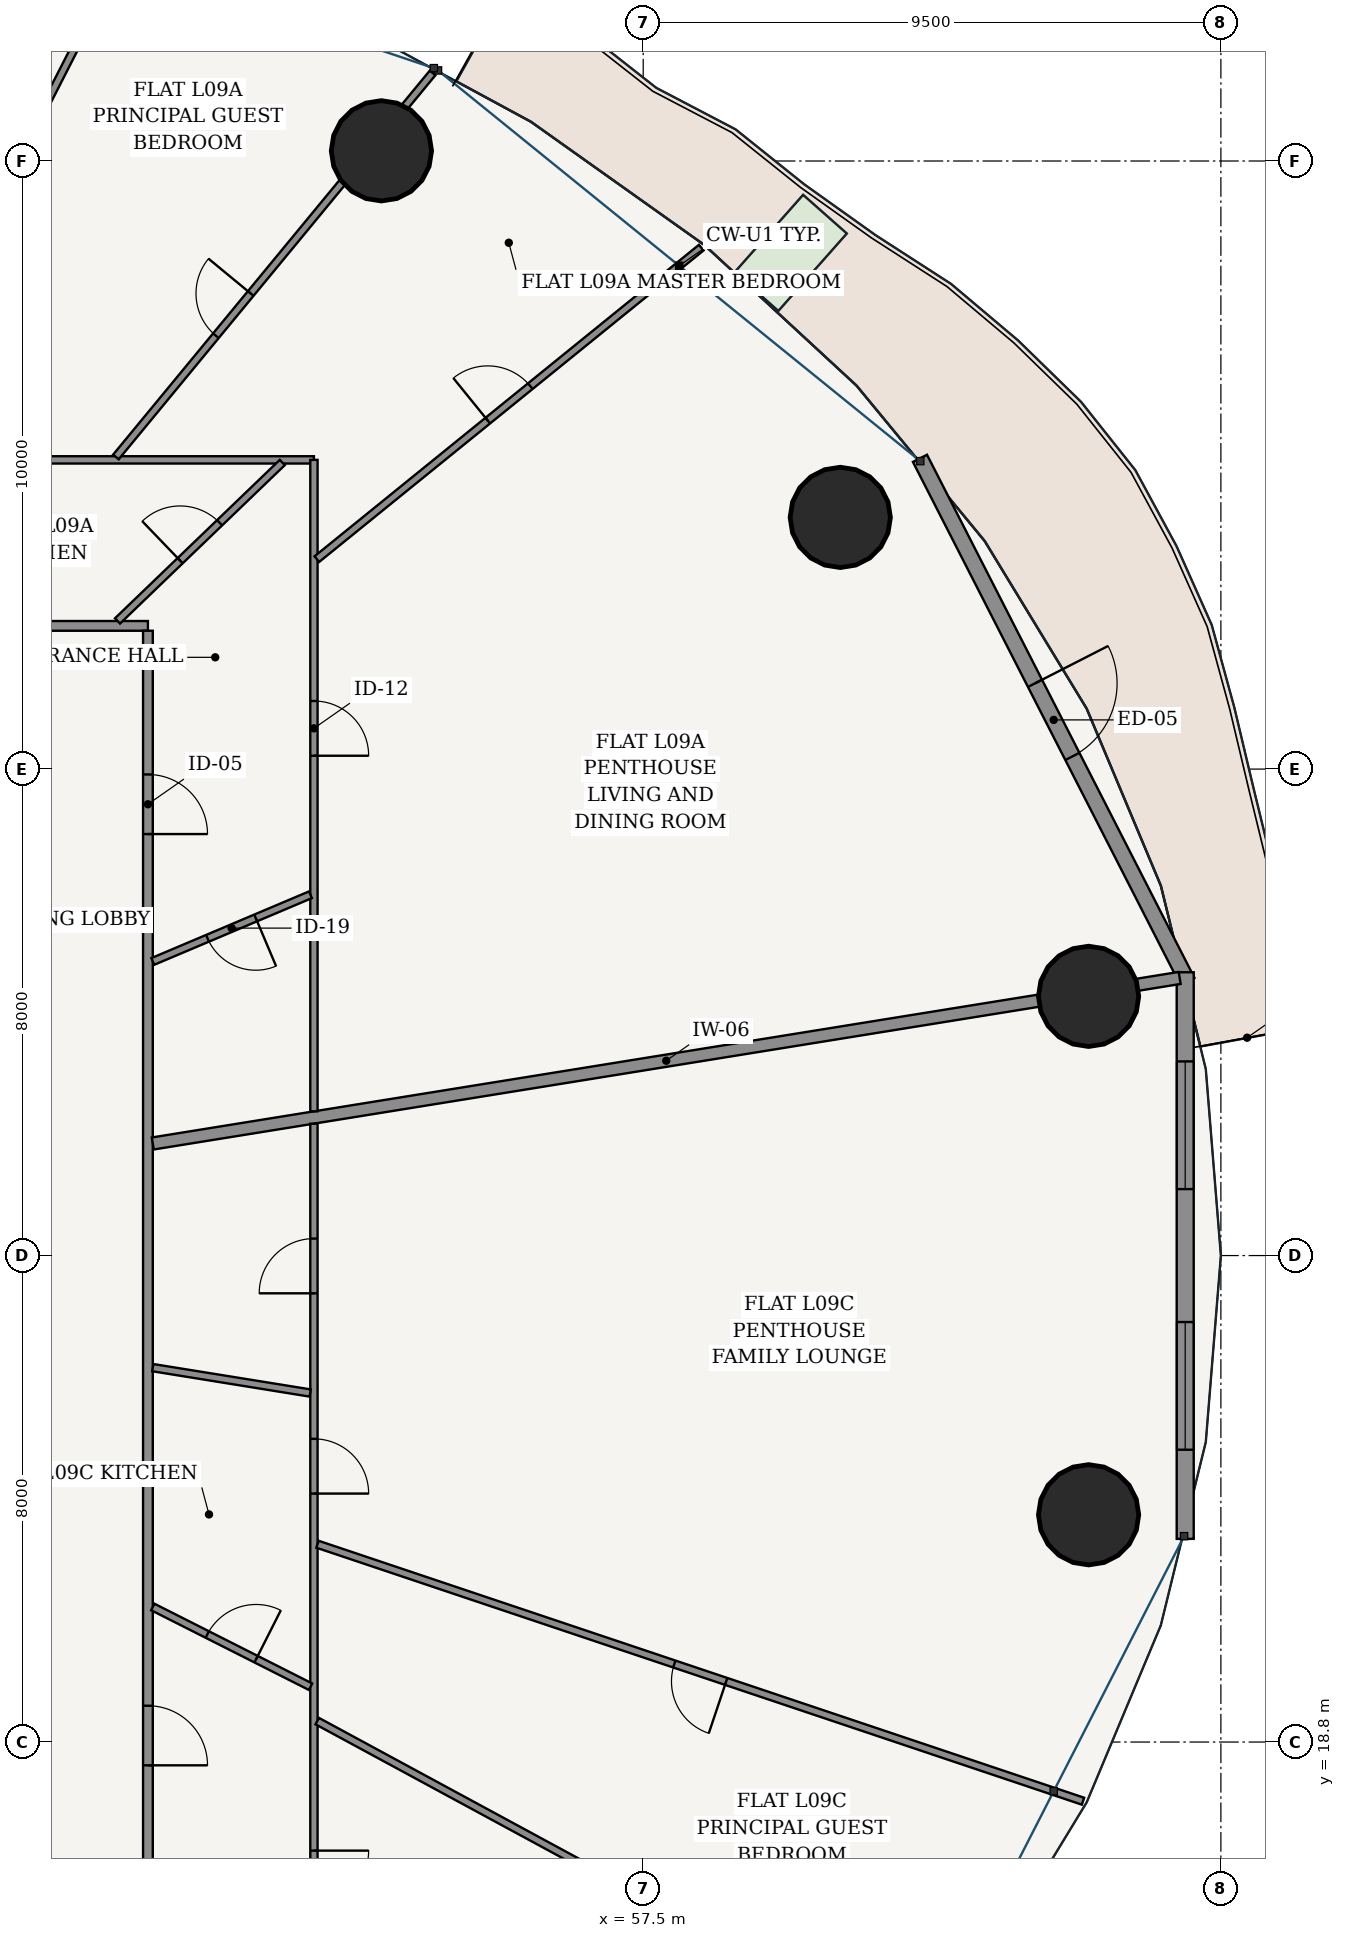
"""IFC4 building model, lengths in metres.
Left out: names, types, materials, properties, quantities, classifications, styles, units other than length and angle.
Written with IfcOpenShell. Run it as: python <this file> out.ifc"""

import sys

from ifc_helpers import new_model, si_unit, direction, frame, frame_2d, origin, origin_2d, place, context, subcontext, project, spatial, rectangle, hollow_circle, extrude, source, transform, mapped, element, fill, save


model = new_model("IFC4")
c1 = context("Model", 3, precision=1e-05, world=origin(), true_north=direction((-0.2419218956, 0.970295726276)))
c2 = subcontext(c1, "Body", "Model", "MODEL_VIEW")
j1 = project(units=[si_unit("LENGTHUNIT", "METRE"), si_unit("PLANEANGLEUNIT", "RADIAN")], contexts=[c1])
p1 = place(None, origin())
s1 = spatial("IfcSite", under=j1, at=p1, CompositionType="ELEMENT")
p2 = place(p1, origin())
s2 = spatial("IfcBuilding", under=s1, at=p2, CompositionType="ELEMENT")
p3 = place(p2, frame((0.0, 0.0, 38.4)))
s3 = spatial("IfcBuildingStorey", under=s2, at=p3, CompositionType="ELEMENT", Elevation=38.4)
for number, where, z_axis, x_axis in (
    (1, (64.824, 31.063, 0.0), (0.0, 0.0, 1.0), (1.0, 0.0, 0.0)),
    (2, (60.741, 38.939, 0.0), (0.0, 0.0, 1.0), (1.0, 0.0, 0.0)),
    (3, (53.195, 44.968, 0.0), (0.0, 0.0, 1.0), (1.0, 0.0, 0.0)),
    (4, (64.824, 22.537, 0.0), (0.0, 0.0, 1.0), (1.0, 0.0, 0.0)),
):
    element("IfcColumn", number, at=place(p3, frame(where, z_axis=z_axis, x_axis=x_axis)), inside=s3, PredefinedType="COLUMN", context=c2, shape_type="SweptSolid", body=[
        extrude(hollow_circle(Radius=0.825, WallThickness=0.05, at=origin_2d()), origin(), (0.0, 0.0, 1.0), 3.6),
    ])
p4 = place(p3, frame((66.45, 31.308, 0.0), z_axis=(0.0, 0.0, 1.0), x_axis=(-0.45523081716, 0.890373462715, 0.0)))
e5 = element("IfcWall", 5, at=p4, inside=s3, PredefinedType="SOLIDWALL", context=c2, shape_type="SweptSolid", body=[
    extrude(rectangle(XDim=9.662, YDim=0.26, at=frame_2d((4.831, 0.0))), origin(), (0.0, 0.0, 1.0), 3.32),
])
p5 = place(p4, frame((4.156, 0.0, 0.0)))
e6 = element("IfcOpeningElement", 6, at=p5, cuts=e5, PredefinedType="OPENING", context=c2, shape_type="SweptSolid", body=[
    extrude(rectangle(XDim=1.35, YDim=2.2, at=frame_2d((0.675, 1.1))), frame((0.0, 0.14, 0.0), z_axis=(0.0, -1.0, 0.0), x_axis=(1.0, 0.0, 0.0)), (0.0, 0.0, 1.0), 0.28),
])
p6 = place(p3, frame((66.413, 22.141, 0.0), z_axis=(0.0, 0.0, 1.0), x_axis=(0.0, 1.0, 0.0)))
e7 = element("IfcWall", 7, at=p6, inside=s3, PredefinedType="SOLIDWALL", context=c2, shape_type="SweptSolid", body=[
    extrude(rectangle(XDim=9.318, YDim=0.28, at=frame_2d((4.659, 0.0))), origin(), (0.0, 0.0, 1.0), 3.32),
])
p7 = place(p6, frame((1.466, 0.0, 0.85)))
e8 = element("IfcOpeningElement", 8, at=p7, cuts=e7, PredefinedType="OPENING", context=c2, shape_type="SweptSolid", body=[
    extrude(rectangle(XDim=2.1, YDim=1.95, at=frame_2d((1.05, 0.975))), frame((0.0, 0.15, 0.0), z_axis=(0.0, -1.0, 0.0), x_axis=(1.0, 0.0, 0.0)), (0.0, 0.0, 1.0), 0.3),
])
p8 = place(p6, frame((5.752, 0.0, 0.85)))
e9 = element("IfcOpeningElement", 9, at=p8, cuts=e7, PredefinedType="OPENING", context=c2, shape_type="SweptSolid", body=[
    extrude(rectangle(XDim=2.1, YDim=1.95, at=frame_2d((1.05, 0.975))), frame((0.0, 0.15, 0.0), z_axis=(0.0, -1.0, 0.0), x_axis=(1.0, 0.0, 0.0)), (0.0, 0.0, 1.0), 0.3),
])
p9 = place(p3, frame((26.645, 37.155, 0.0), z_axis=(0.0, 0.0, 1.0), x_axis=(1.0, 0.0, 0.0)))
e10 = element("IfcWall", 10, at=p9, inside=s3, PredefinedType="PARTITIONING", context=c2, shape_type="SweptSolid", body=[
    extrude(rectangle(XDim=22.71, YDim=0.16, at=frame_2d((11.355, 0.0))), origin(), (0.0, 0.0, 1.0), 2.688),
])
p10 = place(p3, frame((49.355, 16.525, 0.0), z_axis=(0.0, 0.0, 1.0), x_axis=(0.0, 1.0, 0.0)))
e11 = element("IfcWall", 11, at=p10, inside=s3, PredefinedType="PARTITIONING", context=c2, shape_type="SweptSolid", body=[
    extrude(rectangle(XDim=20.55, YDim=0.16, at=frame_2d((10.275, 0.0))), origin(), (0.0, 0.0, 1.0), 2.688),
])
p11 = place(p10, frame((17.207, 0.0, 0.0)))
e12 = element("IfcOpeningElement", 12, at=p11, cuts=e11, PredefinedType="OPENING", context=c2, shape_type="SweptSolid", body=[
    extrude(rectangle(XDim=0.98, YDim=2.2, at=frame_2d((0.49, 1.1))), frame((0.0, 0.09, 0.0), z_axis=(0.0, -1.0, 0.0), x_axis=(1.0, 0.0, 0.0)), (0.0, 0.0, 1.0), 0.18),
])
p12 = place(p10, frame((1.892, 0.0, 0.0)))
e13 = element("IfcOpeningElement", 13, at=p12, cuts=e11, PredefinedType="OPENING", context=c2, shape_type="SweptSolid", body=[
    extrude(rectangle(XDim=0.98, YDim=2.2, at=frame_2d((0.49, 1.1))), frame((0.0, 0.09, 0.0), z_axis=(0.0, -1.0, 0.0), x_axis=(1.0, 0.0, 0.0)), (0.0, 0.0, 1.0), 0.18),
])
p13 = place(p3, frame((49.435, 28.643, 0.0), z_axis=(0.0, 0.0, 1.0), x_axis=(0.987255953651, 0.159140447344, 0.0)))
e14 = element("IfcWall", 14, at=p13, inside=s3, PredefinedType="PARTITIONING", context=c2, shape_type="SweptSolid", body=[
    extrude(rectangle(XDim=17.105, YDim=0.2, at=frame_2d((8.553, 0.0))), origin(), (0.0, 0.0, 1.0), 2.688),
])
p14 = place(p3, frame((27.312, 39.885, 0.0), z_axis=(0.0, 0.0, 1.0), x_axis=(1.0, 0.0, 0.0)))
e15 = element("IfcWall", 15, at=p14, inside=s3, PredefinedType="PARTITIONING", context=c2, shape_type="SweptSolid", body=[
    extrude(rectangle(XDim=24.772, YDim=0.12, at=frame_2d((12.386, 0.0))), origin(), (0.0, 0.0, 1.0), 2.688),
])
p15 = place(p3, frame((52.085, 39.885, 0.0), z_axis=(0.0, 0.0, 1.0), x_axis=(0.0, -1.0, 0.0)))
e16 = element("IfcWall", 16, at=p15, inside=s3, PredefinedType="PARTITIONING", context=c2, shape_type="SweptSolid", body=[
    extrude(rectangle(XDim=10.713, YDim=0.12, at=frame_2d((5.356, 0.0))), origin(), (0.0, 0.0, 1.0), 2.688),
])
p16 = place(p15, frame((3.965, 0.0, 0.0)))
e17 = element("IfcOpeningElement", 17, at=p16, cuts=e16, PredefinedType="OPENING", context=c2, shape_type="SweptSolid", body=[
    extrude(rectangle(XDim=0.9, YDim=2.15, at=frame_2d((0.45, 1.075))), frame((0.0, 0.07, 0.0), z_axis=(0.0, -1.0, 0.0), x_axis=(1.0, 0.0, 0.0)), (0.0, 0.0, 1.0), 0.14),
])
p17 = place(p3, frame((52.133, 38.253, 0.0), z_axis=(0.0, 0.0, 1.0), x_axis=(0.776936623447, 0.629578814087, 0.0)))
e18 = element("IfcWall", 18, at=p17, inside=s3, PredefinedType="PARTITIONING", context=c2, shape_type="SweptSolid", body=[
    extrude(rectangle(XDim=8.136, YDim=0.12, at=frame_2d((4.068, 0.0))), origin(), (0.0, 0.0, 1.0), 2.762),
])
p18 = place(p17, frame((3.618, 0.0, 0.0)))
e19 = element("IfcOpeningElement", 19, at=p18, cuts=e18, PredefinedType="OPENING", context=c2, shape_type="SweptSolid", body=[
    extrude(rectangle(XDim=0.9, YDim=2.15, at=frame_2d((0.45, 1.075))), frame((0.0, 0.07, 0.0), z_axis=(0.0, -1.0, 0.0), x_axis=(1.0, 0.0, 0.0)), (0.0, 0.0, 1.0), 0.14),
])
p19 = place(p3, frame((48.829, 39.933, 0.0), z_axis=(0.0, 0.0, 1.0), x_axis=(0.636192172227, 0.771530634516, 0.0)))
e20 = element("IfcWall", 20, at=p19, inside=s3, PredefinedType="PARTITIONING", context=c2, shape_type="SweptSolid", body=[
    extrude(rectangle(XDim=8.186, YDim=0.12, at=frame_2d((4.093, 0.0))), origin(), (0.0, 0.0, 1.0), 2.688),
])
p20 = place(p19, frame((2.584, 0.0, 0.0)))
e21 = element("IfcOpeningElement", 21, at=p20, cuts=e20, PredefinedType="OPENING", context=c2, shape_type="SweptSolid", body=[
    extrude(rectangle(XDim=0.9, YDim=2.15, at=frame_2d((0.45, 1.075))), frame((0.0, 0.07, 0.0), z_axis=(0.0, -1.0, 0.0), x_axis=(1.0, 0.0, 0.0)), (0.0, 0.0, 1.0), 0.14),
])
p21 = place(p3, frame((44.717, 39.94, 0.0), z_axis=(0.0, 0.0, 1.0), x_axis=(0.455131303234, 0.890424335256, 0.0)))
e22 = element("IfcWall", 22, at=p21, inside=s3, PredefinedType="PARTITIONING", context=c2, shape_type="SweptSolid", body=[
    extrude(rectangle(XDim=9.562, YDim=0.12, at=frame_2d((4.781, 0.0))), origin(), (0.0, 0.0, 1.0), 2.762),
])
p22 = place(p21, frame((4.331, 0.0, 0.0)))
e23 = element("IfcOpeningElement", 23, at=p22, cuts=e22, PredefinedType="OPENING", context=c2, shape_type="SweptSolid", body=[
    extrude(rectangle(XDim=0.9, YDim=2.15, at=frame_2d((0.45, 1.075))), frame((0.0, 0.07, 0.0), z_axis=(0.0, -1.0, 0.0), x_axis=(1.0, 0.0, 0.0)), (0.0, 0.0, 1.0), 0.14),
])
p23 = place(p3, frame((49.435, 31.636, 0.0), z_axis=(0.0, 0.0, 1.0), x_axis=(0.920969644836, 0.389634332792, 0.0)))
e24 = element("IfcWall", 24, at=p23, inside=s3, PredefinedType="PARTITIONING", context=c2, shape_type="SweptSolid", body=[
    extrude(rectangle(XDim=2.815, YDim=0.12, at=frame_2d((1.408, 0.0))), origin(), (0.0, 0.0, 1.0), 3.32),
])
p24 = place(p23, frame((0.978, 0.0, 0.0)))
e25 = element("IfcOpeningElement", 25, at=p24, cuts=e24, PredefinedType="OPENING", context=c2, shape_type="SweptSolid", body=[
    extrude(rectangle(XDim=0.86, YDim=2.15, at=frame_2d((0.43, 1.075))), frame((0.0, 0.07, 0.0), z_axis=(0.0, -1.0, 0.0), x_axis=(1.0, 0.0, 0.0)), (0.0, 0.0, 1.0), 0.14),
])
p25 = place(p3, frame((48.855, 37.236, 0.0), z_axis=(0.0, 0.0, 1.0), x_axis=(0.720835560675, 0.693106120638, 0.0)))
e26 = element("IfcWall", 26, at=p25, inside=s3, PredefinedType="PARTITIONING", context=c2, shape_type="SweptSolid", body=[
    extrude(rectangle(XDim=3.76, YDim=0.12, at=frame_2d((1.88, 0.0))), origin(), (0.0, 0.0, 1.0), 2.999),
])
p26 = place(p25, frame((1.43, 0.0, 0.0)))
e27 = element("IfcOpeningElement", 27, at=p26, cuts=e26, PredefinedType="OPENING", context=c2, shape_type="SweptSolid", body=[
    extrude(rectangle(XDim=0.9, YDim=2.15, at=frame_2d((0.45, 1.075))), frame((0.0, 0.07, 0.0), z_axis=(0.0, -1.0, 0.0), x_axis=(1.0, 0.0, 0.0)), (0.0, 0.0, 1.0), 0.14),
])
p27 = place(p3, frame((52.085, 28.968, 0.0), z_axis=(0.0, 0.0, 1.0), x_axis=(0.0, -1.0, 0.0)))
e28 = element("IfcWall", 28, at=p27, inside=s3, PredefinedType="PARTITIONING", context=c2, shape_type="SweptSolid", body=[
    extrude(rectangle(XDim=15.253, YDim=0.12, at=frame_2d((7.626, 0.0))), origin(), (0.0, 0.0, 1.0), 2.688),
])
p28 = place(p27, frame((11.954, 0.0, 0.0)))
e29 = element("IfcOpeningElement", 29, at=p28, cuts=e28, PredefinedType="OPENING", context=c2, shape_type="SweptSolid", body=[
    extrude(rectangle(XDim=0.9, YDim=2.15, at=frame_2d((0.45, 1.075))), frame((0.0, 0.07, 0.0), z_axis=(0.0, -1.0, 0.0), x_axis=(1.0, 0.0, 0.0)), (0.0, 0.0, 1.0), 0.14),
])
p29 = place(p27, frame((5.182, 0.0, 0.0)))
e30 = element("IfcOpeningElement", 30, at=p29, cuts=e28, PredefinedType="OPENING", context=c2, shape_type="SweptSolid", body=[
    extrude(rectangle(XDim=0.9, YDim=2.15, at=frame_2d((0.45, 1.075))), frame((0.0, 0.07, 0.0), z_axis=(0.0, -1.0, 0.0), x_axis=(1.0, 0.0, 0.0)), (0.0, 0.0, 1.0), 0.14),
])
p30 = place(p27, frame((1.889, 0.0, 0.0)))
e31 = element("IfcOpeningElement", 31, at=p30, cuts=e28, PredefinedType="OPENING", context=c2, shape_type="SweptSolid", body=[
    extrude(rectangle(XDim=0.9, YDim=2.15, at=frame_2d((0.45, 1.075))), frame((0.0, 0.07, 0.0), z_axis=(0.0, -1.0, 0.0), x_axis=(1.0, 0.0, 0.0)), (0.0, 0.0, 1.0), 0.14),
])
p31 = place(p3, frame((52.139, 19.144, 0.0), z_axis=(0.0, 0.0, 1.0), x_axis=(0.879372452045, -0.476134529922, 0.0)))
e32 = element("IfcWall", 32, at=p31, inside=s3, PredefinedType="PARTITIONING", context=c2, shape_type="SweptSolid", body=[
    extrude(rectangle(XDim=11.219, YDim=0.12, at=frame_2d((5.61, 0.0))), origin(), (0.0, 0.0, 1.0), 2.688),
])
p32 = place(p3, frame((52.144, 22.052, 0.0), z_axis=(0.0, 0.0, 1.0), x_axis=(0.948023034133, -0.318201707653, 0.0)))
e33 = element("IfcWall", 33, at=p32, inside=s3, PredefinedType="PARTITIONING", context=c2, shape_type="SweptSolid", body=[
    extrude(rectangle(XDim=13.279, YDim=0.12, at=frame_2d((6.639, 0.0))), origin(), (0.0, 0.0, 1.0), 2.762),
])
p33 = place(p32, frame((6.189, 0.0, 0.0)))
e34 = element("IfcOpeningElement", 34, at=p33, cuts=e33, PredefinedType="OPENING", context=c2, shape_type="SweptSolid", body=[
    extrude(rectangle(XDim=0.9, YDim=2.15, at=frame_2d((0.45, 1.075))), frame((0.0, 0.07, 0.0), z_axis=(0.0, -1.0, 0.0), x_axis=(1.0, 0.0, 0.0)), (0.0, 0.0, 1.0), 0.14),
])
p34 = place(p3, frame((49.435, 21.021, 0.0), z_axis=(0.0, 0.0, 1.0), x_axis=(0.892504324967, -0.451038834155, 0.0)))
e35 = element("IfcWall", 35, at=p34, inside=s3, PredefinedType="PARTITIONING", context=c2, shape_type="SweptSolid", body=[
    extrude(rectangle(XDim=2.907, YDim=0.12, at=frame_2d((1.454, 0.0))), origin(), (0.0, 0.0, 1.0), 3.32),
])
p35 = place(p34, frame((1.004, 0.0, 0.0)))
e36 = element("IfcOpeningElement", 36, at=p35, cuts=e35, PredefinedType="OPENING", context=c2, shape_type="SweptSolid", body=[
    extrude(rectangle(XDim=0.9, YDim=2.15, at=frame_2d((0.45, 1.075))), frame((0.0, 0.07, 0.0), z_axis=(0.0, -1.0, 0.0), x_axis=(1.0, 0.0, 0.0)), (0.0, 0.0, 1.0), 0.14),
])
p36 = place(p3, frame((49.435, 24.957, 0.0), z_axis=(0.0, 0.0, 1.0), x_axis=(0.987258113076, -0.159127050386, 0.0)))
e37 = element("IfcWall", 37, at=p36, inside=s3, PredefinedType="PARTITIONING", context=c2, shape_type="SweptSolid", body=[
    extrude(rectangle(XDim=2.622, YDim=0.12, at=frame_2d((1.311, 0.0))), origin(), (0.0, 0.0, 1.0), 2.688),
])
m1 = source(origin(), c2, "Body", "SweptSolid", [
    extrude(rectangle(XDim=1.35, YDim=2.2, at=frame_2d((0.675, 1.1))), frame((0.0, 0.025, 0.0), z_axis=(0.0, -1.0, 0.0), x_axis=(1.0, 0.0, 0.0)), (0.0, 0.0, 1.0), 0.05),
])
p37 = place(p5, frame((1.35, 0.0, 0.0), z_axis=(0.0, 0.0, 1.0), x_axis=(-1.0, 0.0, 0.0)))
e38 = element("IfcDoor", 38, at=p37, inside=s3, OperationType="SINGLE_SWING_LEFT", PredefinedType="DOOR", context=c2, shape_type="MappedRepresentation", body=[
    mapped(m1, transform((0.0, 0.0, 0.0), scale=1.0)),
])
fill(e6, e38)
m2 = source(origin(), c2, "Body", "SweptSolid", [
    extrude(rectangle(XDim=2.1, YDim=1.95, at=frame_2d((1.05, 0.975))), frame((0.0, 0.03, 0.0), z_axis=(0.0, -1.0, 0.0), x_axis=(1.0, 0.0, 0.0)), (0.0, 0.0, 1.0), 0.06),
])
p38 = place(p7, origin())
e39 = element("IfcWindow", 39, at=p38, inside=s3, PartitioningType="SINGLE_PANEL", PredefinedType="WINDOW", context=c2, shape_type="MappedRepresentation", body=[
    mapped(m2, transform((0.0, 0.0, 0.0), scale=1.0)),
])
fill(e8, e39)
p39 = place(p8, origin())
e40 = element("IfcWindow", 40, at=p39, inside=s3, PartitioningType="SINGLE_PANEL", PredefinedType="WINDOW", context=c2, shape_type="MappedRepresentation", body=[
    mapped(m2, transform((0.0, 0.0, 0.0), scale=1.0)),
])
fill(e9, e40)
m3 = source(origin(), c2, "Body", "SweptSolid", [
    extrude(rectangle(XDim=0.98, YDim=2.2, at=frame_2d((0.49, 1.1))), frame((0.0, 0.025, 0.0), z_axis=(0.0, -1.0, 0.0), x_axis=(1.0, 0.0, 0.0)), (0.0, 0.0, 1.0), 0.05),
])
p40 = place(p11, frame((0.98, 0.0, 0.0), z_axis=(0.0, 0.0, 1.0), x_axis=(-1.0, 0.0, 0.0)))
e41 = element("IfcDoor", 41, at=p40, inside=s3, OperationType="SINGLE_SWING_RIGHT", PredefinedType="DOOR", context=c2, shape_type="MappedRepresentation", body=[
    mapped(m3, transform((0.0, 0.0, 0.0), scale=1.0)),
])
fill(e12, e41)
m4 = source(origin(), c2, "Body", "SweptSolid", [
    extrude(rectangle(XDim=0.86, YDim=2.15, at=frame_2d((0.43, 1.075))), frame((0.0, 0.025, 0.0), z_axis=(0.0, -1.0, 0.0), x_axis=(1.0, 0.0, 0.0)), (0.0, 0.0, 1.0), 0.05),
])
p41 = place(p24, frame((0.86, 0.0, 0.0), z_axis=(0.0, 0.0, 1.0), x_axis=(-1.0, 0.0, 0.0)))
e42 = element("IfcDoor", 42, at=p41, inside=s3, OperationType="SINGLE_SWING_LEFT", PredefinedType="DOOR", context=c2, shape_type="MappedRepresentation", body=[
    mapped(m4, transform((0.0, 0.0, 0.0), scale=1.0)),
])
fill(e25, e42)
m5 = source(origin(), c2, "Body", "SweptSolid", [
    extrude(rectangle(XDim=0.9, YDim=2.15, at=frame_2d((0.45, 1.075))), frame((0.0, 0.025, 0.0), z_axis=(0.0, -1.0, 0.0), x_axis=(1.0, 0.0, 0.0)), (0.0, 0.0, 1.0), 0.05),
])
p42 = place(p16, origin())
e43 = element("IfcDoor", 43, at=p42, inside=s3, OperationType="SINGLE_SWING_RIGHT", PredefinedType="DOOR", context=c2, shape_type="MappedRepresentation", body=[
    mapped(m5, transform((0.0, 0.0, 0.0), scale=1.0)),
])
fill(e17, e43)
p43 = place(p26, origin())
e44 = element("IfcDoor", 44, at=p43, inside=s3, OperationType="SINGLE_SWING_LEFT", PredefinedType="DOOR", context=c2, shape_type="MappedRepresentation", body=[
    mapped(m5, transform((0.0, 0.0, 0.0), scale=1.0)),
])
fill(e27, e44)
p44 = place(p18, origin())
e45 = element("IfcDoor", 45, at=p44, inside=s3, OperationType="SINGLE_SWING_LEFT", PredefinedType="DOOR", context=c2, shape_type="MappedRepresentation", body=[
    mapped(m5, transform((0.0, 0.0, 0.0), scale=1.0)),
])
fill(e19, e45)
p45 = place(p20, origin())
e46 = element("IfcDoor", 46, at=p45, inside=s3, OperationType="SINGLE_SWING_RIGHT", PredefinedType="DOOR", context=c2, shape_type="MappedRepresentation", body=[
    mapped(m5, transform((0.0, 0.0, 0.0), scale=1.0)),
])
fill(e21, e46)
p46 = place(p12, frame((0.98, 0.0, 0.0), z_axis=(0.0, 0.0, 1.0), x_axis=(-1.0, 0.0, 0.0)))
e47 = element("IfcDoor", 47, at=p46, inside=s3, OperationType="SINGLE_SWING_RIGHT", PredefinedType="DOOR", context=c2, shape_type="MappedRepresentation", body=[
    mapped(m3, transform((0.0, 0.0, 0.0), scale=1.0)),
])
fill(e13, e47)
p47 = place(p35, origin())
e48 = element("IfcDoor", 48, at=p47, inside=s3, OperationType="SINGLE_SWING_RIGHT", PredefinedType="DOOR", context=c2, shape_type="MappedRepresentation", body=[
    mapped(m5, transform((0.0, 0.0, 0.0), scale=1.0)),
])
fill(e36, e48)
p48 = place(p28, origin())
e49 = element("IfcDoor", 49, at=p48, inside=s3, OperationType="SINGLE_SWING_LEFT", PredefinedType="DOOR", context=c2, shape_type="MappedRepresentation", body=[
    mapped(m5, transform((0.0, 0.0, 0.0), scale=1.0)),
])
fill(e29, e49)
p49 = place(p29, origin())
e50 = element("IfcDoor", 50, at=p49, inside=s3, OperationType="SINGLE_SWING_RIGHT", PredefinedType="DOOR", context=c2, shape_type="MappedRepresentation", body=[
    mapped(m5, transform((0.0, 0.0, 0.0), scale=1.0)),
])
fill(e30, e50)
p50 = place(p30, frame((0.9, 0.0, 0.0), z_axis=(0.0, 0.0, 1.0), x_axis=(-1.0, 0.0, 0.0)))
e51 = element("IfcDoor", 51, at=p50, inside=s3, OperationType="SINGLE_SWING_LEFT", PredefinedType="DOOR", context=c2, shape_type="MappedRepresentation", body=[
    mapped(m5, transform((0.0, 0.0, 0.0), scale=1.0)),
])
fill(e31, e51)
p51 = place(p33, frame((0.9, 0.0, 0.0), z_axis=(0.0, 0.0, 1.0), x_axis=(-1.0, 0.0, 0.0)))
e52 = element("IfcDoor", 52, at=p51, inside=s3, OperationType="SINGLE_SWING_LEFT", PredefinedType="DOOR", context=c2, shape_type="MappedRepresentation", body=[
    mapped(m5, transform((0.0, 0.0, 0.0), scale=1.0)),
])
fill(e34, e52)
save(model, sys.argv[1])
